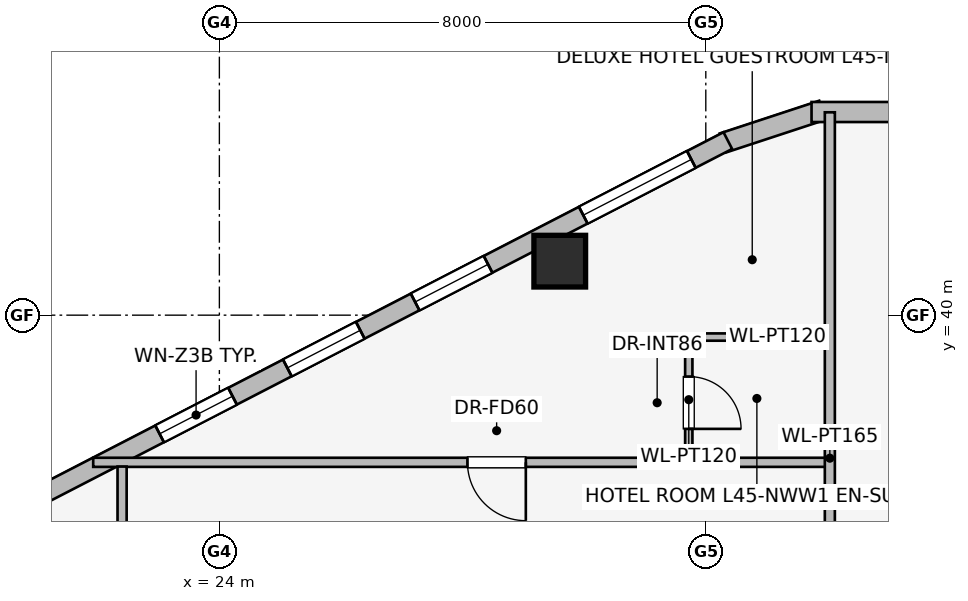
"""IFC4 building model, lengths in metres.
Left out: names, types, materials, properties, quantities, classifications, styles, units other than length and angle.
Written with IfcOpenShell. Run it as: python <this file> out.ifc"""

import sys

from ifc_helpers import new_model, si_unit, direction, frame, frame_2d, origin, origin_2d, place, context, subcontext, project, spatial, rectangle, extrude, element, fill, save


model = new_model("IFC4")
c1 = context("Model", 3, precision=1e-05, world=origin(), true_north=direction((0.0, 1.0)))
c2 = subcontext(c1, "Body", "Model", "MODEL_VIEW")
j1 = project(units=[si_unit("LENGTHUNIT", "METRE"), si_unit("PLANEANGLEUNIT", "RADIAN")], contexts=[c1])
p1 = place(None, origin())
s1 = spatial("IfcSite", under=j1, at=p1, CompositionType="ELEMENT")
p2 = place(p1, origin())
s2 = spatial("IfcBuilding", under=s1, at=p2, CompositionType="ELEMENT")
p3 = place(p2, frame((0.0, 0.0, 167.1)))
s3 = spatial("IfcBuildingStorey", under=s2, at=p3, CompositionType="ELEMENT", Elevation=167.1)
p4 = place(p3, frame((29.598, 40.888, 0.0), z_axis=(0.0, 0.0, 1.0), x_axis=(1.0, 0.0, 0.0)))
e1 = element("IfcColumn", 1, at=p4, inside=s3, PredefinedType="COLUMN", context=c2, shape_type="SweptSolid", body=[
    extrude(rectangle(XDim=0.85, YDim=0.85, at=origin_2d()), origin(), (0.0, 0.0, 1.0), 3.45),
])
p5 = place(p3, frame((32.281, 42.832, 0.0), z_axis=(0.0, 0.0, 1.0), x_axis=(0.949937416267, 0.312440242569, 0.0)))
e2 = element("IfcWall", 2, at=p5, inside=s3, PredefinedType="STANDARD", context=c2, shape_type="SweptSolid", body=[
    extrude(rectangle(XDim=1.722, YDim=0.33, at=frame_2d((0.861, 0.0))), origin(), (0.0, 0.0, 1.0), 3.19),
])
p6 = place(p3, frame((33.739, 43.341, 0.0), z_axis=(0.0, 0.0, 1.0), x_axis=(1.0, 0.0, 0.0)))
e3 = element("IfcWall", 3, at=p6, inside=s3, PredefinedType="STANDARD", context=c2, shape_type="SweptSolid", body=[
    extrude(rectangle(XDim=1.722, YDim=0.33, at=frame_2d((0.861, 0.0))), origin(), (0.0, 0.0, 1.0), 3.19),
])
p7 = place(p3, frame((17.408, 35.153, 0.0), z_axis=(0.0, 0.0, 1.0), x_axis=(0.888626188278, 0.458632202867, 0.0)))
e4 = element("IfcWall", 4, at=p7, inside=s3, PredefinedType="STANDARD", context=c2, shape_type="SweptSolid", body=[
    extrude(rectangle(XDim=16.828, YDim=0.31, at=frame_2d((8.414, 0.0))), origin(), (0.0, 0.0, 1.0), 3.19),
])
p8 = place(p7, frame((0.675, 0.0, 0.75)))
e5 = element("IfcOpeningElement", 5, at=p8, cuts=e4, PredefinedType="OPENING", context=c2, shape_type="SweptSolid", body=[
    extrude(rectangle(XDim=2.0, YDim=1.5, at=frame_2d((1.0, 0.75))), frame((0.0, 0.165, 0.0), z_axis=(0.0, -1.0, 0.0), x_axis=(1.0, 0.0, 0.0)), (0.0, 0.0, 1.0), 0.33),
])
p9 = place(p7, frame((6.312, 0.0, 0.75)))
e6 = element("IfcOpeningElement", 6, at=p9, cuts=e4, PredefinedType="OPENING", context=c2, shape_type="SweptSolid", body=[
    extrude(rectangle(XDim=1.35, YDim=1.45, at=frame_2d((0.675, 0.725))), frame((0.0, 0.165, 0.0), z_axis=(0.0, -1.0, 0.0), x_axis=(1.0, 0.0, 0.0)), (0.0, 0.0, 1.0), 0.33),
])
p10 = place(p7, frame((8.676, 0.0, 0.75)))
e7 = element("IfcOpeningElement", 7, at=p10, cuts=e4, PredefinedType="OPENING", context=c2, shape_type="SweptSolid", body=[
    extrude(rectangle(XDim=1.35, YDim=1.45, at=frame_2d((0.675, 0.725))), frame((0.0, 0.165, 0.0), z_axis=(0.0, -1.0, 0.0), x_axis=(1.0, 0.0, 0.0)), (0.0, 0.0, 1.0), 0.33),
])
p11 = place(p7, frame((11.041, 0.0, 0.75)))
e8 = element("IfcOpeningElement", 8, at=p11, cuts=e4, PredefinedType="OPENING", context=c2, shape_type="SweptSolid", body=[
    extrude(rectangle(XDim=1.35, YDim=1.45, at=frame_2d((0.675, 0.725))), frame((0.0, 0.165, 0.0), z_axis=(0.0, -1.0, 0.0), x_axis=(1.0, 0.0, 0.0)), (0.0, 0.0, 1.0), 0.33),
])
p12 = place(p7, frame((14.153, 0.0, 0.75)))
e9 = element("IfcOpeningElement", 9, at=p12, cuts=e4, PredefinedType="OPENING", context=c2, shape_type="SweptSolid", body=[
    extrude(rectangle(XDim=2.0, YDim=1.5, at=frame_2d((1.0, 0.75))), frame((0.0, 0.165, 0.0), z_axis=(0.0, -1.0, 0.0), x_axis=(1.0, 0.0, 0.0)), (0.0, 0.0, 1.0), 0.33),
])
p13 = place(p3, frame((34.0, 39.64, 0.0), z_axis=(0.0, 0.0, 1.0), x_axis=(-1.0, 0.0, 0.0)))
e10 = element("IfcWall", 10, at=p13, inside=s3, PredefinedType="PARTITIONING", context=c2, shape_type="SweptSolid", body=[
    extrude(rectangle(XDim=2.34, YDim=0.12, at=frame_2d((1.17, 0.0))), origin(), (0.0, 0.0, 1.0), 3.19),
])
p14 = place(p3, frame((31.72, 39.64, 0.0), z_axis=(0.0, 0.0, 1.0), x_axis=(0.0, -1.0, 0.0)))
e11 = element("IfcWall", 11, at=p14, inside=s3, PredefinedType="PARTITIONING", context=c2, shape_type="SweptSolid", body=[
    extrude(rectangle(XDim=2.06, YDim=0.12, at=frame_2d((1.03, 0.0))), origin(), (0.0, 0.0, 1.0), 3.19),
])
p15 = place(p14, frame((0.65, 0.0, 0.0)))
e12 = element("IfcOpeningElement", 12, at=p15, cuts=e11, PredefinedType="OPENING", context=c2, shape_type="SweptSolid", body=[
    extrude(rectangle(XDim=0.86, YDim=2.0, at=frame_2d((0.43, 1.0))), frame((0.0, 0.07, 0.0), z_axis=(0.0, -1.0, 0.0), x_axis=(1.0, 0.0, 0.0)), (0.0, 0.0, 1.0), 0.14),
])
p16 = place(p3, frame((34.0, 37.58, 0.0), z_axis=(0.0, 0.0, 1.0), x_axis=(-1.0, 0.0, 0.0)))
e13 = element("IfcWall", 13, at=p16, inside=s3, PredefinedType="PARTITIONING", context=c2, shape_type="SweptSolid", body=[
    extrude(rectangle(XDim=12.075, YDim=0.15, at=frame_2d((6.038, 0.0))), origin(), (0.0, 0.0, 1.0), 2.582),
])
p17 = place(p16, frame((4.96, 0.0, 0.0)))
e14 = element("IfcOpeningElement", 14, at=p17, cuts=e13, PredefinedType="OPENING", context=c2, shape_type="SweptSolid", body=[
    extrude(rectangle(XDim=0.96, YDim=2.0, at=frame_2d((0.48, 1.0))), frame((0.0, 0.085, 0.0), z_axis=(0.0, -1.0, 0.0), x_axis=(1.0, 0.0, 0.0)), (0.0, 0.0, 1.0), 0.17),
])
p18 = place(p3, frame((34.04, 31.96, 0.0), z_axis=(0.0, 0.0, 1.0), x_axis=(0.0, 1.0, 0.0)))
e15 = element("IfcWall", 15, at=p18, inside=s3, PredefinedType="PARTITIONING", context=c2, shape_type="SweptSolid", body=[
    extrude(rectangle(XDim=11.376, YDim=0.165, at=frame_2d((5.688, 0.0))), origin(), (0.0, 0.0, 1.0), 3.19),
])
p19 = place(p3, frame((22.4, 36.08, 0.0), z_axis=(0.0, 0.0, 1.0), x_axis=(0.0, 1.0, 0.0)))
e16 = element("IfcWall", 16, at=p19, inside=s3, PredefinedType="PARTITIONING", context=c2, shape_type="SweptSolid", body=[
    extrude(rectangle(XDim=1.43, YDim=0.15, at=frame_2d((0.715, 0.0))), origin(), (0.0, 0.0, 1.0), 3.19),
])
p20 = place(p9, origin())
e17 = element("IfcWindow", 17, at=p20, inside=s3, PartitioningType="SINGLE_PANEL", PredefinedType="WINDOW", context=c2, shape_type="SweptSolid", body=[
    extrude(rectangle(XDim=1.35, YDim=1.45, at=frame_2d((0.675, 0.725))), frame((0.0, 0.03, 0.0), z_axis=(0.0, -1.0, 0.0), x_axis=(1.0, 0.0, 0.0)), (0.0, 0.0, 1.0), 0.06),
])
fill(e6, e17)
p21 = place(p10, origin())
e18 = element("IfcWindow", 18, at=p21, inside=s3, PartitioningType="SINGLE_PANEL", PredefinedType="WINDOW", context=c2, shape_type="SweptSolid", body=[
    extrude(rectangle(XDim=1.35, YDim=1.45, at=frame_2d((0.675, 0.725))), frame((0.0, 0.03, 0.0), z_axis=(0.0, -1.0, 0.0), x_axis=(1.0, 0.0, 0.0)), (0.0, 0.0, 1.0), 0.06),
])
fill(e7, e18)
p22 = place(p11, origin())
e19 = element("IfcWindow", 19, at=p22, inside=s3, PartitioningType="SINGLE_PANEL", PredefinedType="WINDOW", context=c2, shape_type="SweptSolid", body=[
    extrude(rectangle(XDim=1.35, YDim=1.45, at=frame_2d((0.675, 0.725))), frame((0.0, 0.03, 0.0), z_axis=(0.0, -1.0, 0.0), x_axis=(1.0, 0.0, 0.0)), (0.0, 0.0, 1.0), 0.06),
])
fill(e8, e19)
p23 = place(p12, origin())
e20 = element("IfcWindow", 20, at=p23, inside=s3, PartitioningType="SINGLE_PANEL", PredefinedType="WINDOW", context=c2, shape_type="SweptSolid", body=[
    extrude(rectangle(XDim=2.0, YDim=1.5, at=frame_2d((1.0, 0.75))), frame((0.0, 0.03, 0.0), z_axis=(0.0, -1.0, 0.0), x_axis=(1.0, 0.0, 0.0)), (0.0, 0.0, 1.0), 0.06),
])
fill(e9, e20)
p24 = place(p15, origin())
e21 = element("IfcDoor", 21, at=p24, inside=s3, OperationType="SINGLE_SWING_RIGHT", PredefinedType="DOOR", context=c2, shape_type="SweptSolid", body=[
    extrude(rectangle(XDim=0.86, YDim=2.0, at=frame_2d((0.43, 1.0))), frame((0.0, 0.025, 0.0), z_axis=(0.0, -1.0, 0.0), x_axis=(1.0, 0.0, 0.0)), (0.0, 0.0, 1.0), 0.05),
])
fill(e12, e21)
p25 = place(p17, origin())
e22 = element("IfcDoor", 22, at=p25, inside=s3, OperationType="SINGLE_SWING_LEFT", PredefinedType="DOOR", context=c2, shape_type="SweptSolid", body=[
    extrude(rectangle(XDim=0.96, YDim=2.0, at=frame_2d((0.48, 1.0))), frame((0.0, 0.025, 0.0), z_axis=(0.0, -1.0, 0.0), x_axis=(1.0, 0.0, 0.0)), (0.0, 0.0, 1.0), 0.05),
])
fill(e14, e22)
save(model, sys.argv[1])
